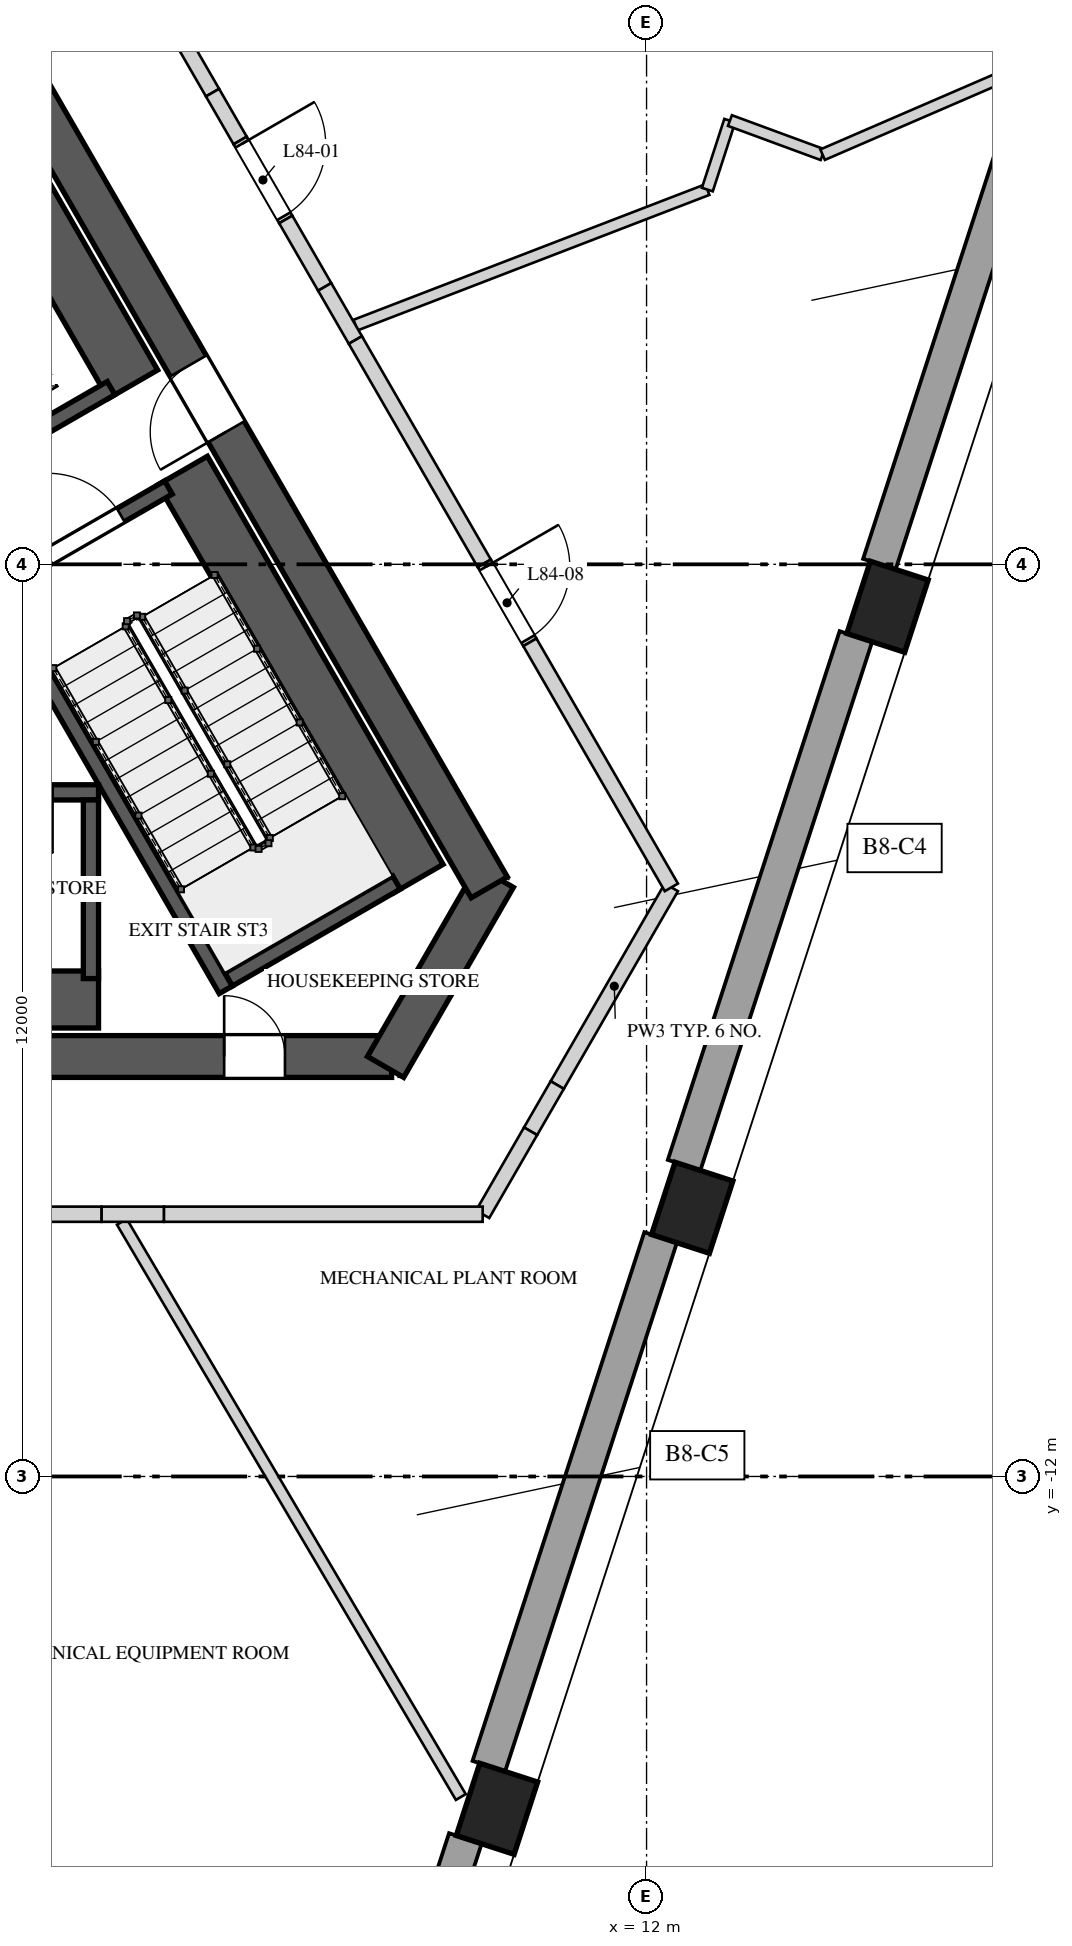
"""IFC4 building model, lengths in metres.
Left out: names, types, materials, properties, quantities, classifications, styles, units other than length and angle.
Written with IfcOpenShell. Run it as: python <this file> out.ifc"""

import sys

from ifc_helpers import new_model, si_unit, direction, frame, frame_2d, origin, origin_2d, place, context, subcontext, project, spatial, polyline, rectangle, outline, extrude, element, fill, save


model = new_model("IFC4")
c1 = context("Model", 3, precision=1e-05, world=origin(), true_north=direction((0.0, 1.0)))
c2 = subcontext(c1, "Body", "Model", "MODEL_VIEW")
j1 = project(units=[si_unit("LENGTHUNIT", "METRE"), si_unit("PLANEANGLEUNIT", "RADIAN")], contexts=[c1])
p1 = place(None, origin())
s1 = spatial("IfcSite", under=j1, at=p1, CompositionType="ELEMENT")
p2 = place(p1, origin())
s2 = spatial("IfcBuilding", under=s1, at=p2, CompositionType="ELEMENT")
p3 = place(p2, frame((0.0, 0.0, 365.9)))
s3 = spatial("IfcBuildingStorey", under=s2, at=p3, CompositionType="ELEMENT", Elevation=365.9)
p4 = place(p3, frame((-8.646, -6.475, 0.0), z_axis=(0.0, 0.0, 1.0), x_axis=(1.0, 0.0, 0.0)))
e1 = element("IfcWall", 1, at=p4, inside=s3, PredefinedType="SHEAR", context=c2, shape_type="SweptSolid", body=[
    extrude(rectangle(XDim=17.292, YDim=0.55, at=frame_2d((8.646, 0.0))), origin(), (0.0, 0.0, 1.0), 4.5),
])
p5 = place(p4, frame((6.851, 0.0, 0.0)))
e2 = element("IfcOpeningElement", 2, at=p5, cuts=e1, PredefinedType="OPENING", context=c2, shape_type="SweptSolid", body=[
    extrude(rectangle(XDim=1.0, YDim=2.4, at=frame_2d((0.5, 1.2))), frame((0.0, 0.285, 0.0), z_axis=(0.0, -1.0, 0.0), x_axis=(1.0, 0.0, 0.0)), (0.0, 0.0, 1.0), 0.57),
])
p6 = place(p4, frame((15.089, 0.0, 0.0)))
e3 = element("IfcOpeningElement", 3, at=p6, cuts=e1, PredefinedType="OPENING", context=c2, shape_type="SweptSolid", body=[
    extrude(rectangle(XDim=0.8, YDim=2.1, at=frame_2d((0.4, 1.05))), frame((0.0, 0.285, 0.0), z_axis=(0.0, -1.0, 0.0), x_axis=(1.0, 0.0, 0.0)), (0.0, 0.0, 1.0), 0.57),
])
p7 = place(p3, frame((8.566, -6.613, 0.0), z_axis=(0.0, 0.0, 1.0), x_axis=(0.499995765644, 0.866027848477, 0.0)))
e4 = element("IfcWall", 4, at=p7, inside=s3, PredefinedType="SHEAR", context=c2, shape_type="SweptSolid", body=[
    extrude(rectangle(XDim=2.887, YDim=0.55, at=frame_2d((1.443, 0.0))), origin(), (0.0, 0.0, 1.0), 4.5),
])
p8 = place(p3, frame((9.93, -4.25, 0.0), z_axis=(0.0, 0.0, 1.0), x_axis=(-0.499994590896, 0.86602852671, 0.0)))
e5 = element("IfcWall", 5, at=p8, inside=s3, PredefinedType="SHEAR", context=c2, shape_type="SweptSolid", body=[
    extrude(rectangle(XDim=17.292, YDim=0.55, at=frame_2d((8.646, 0.0))), origin(), (0.0, 0.0, 1.0), 4.5),
])
p9 = place(p8, frame((6.921, 0.0, 0.0)))
e6 = element("IfcOpeningElement", 6, at=p9, cuts=e5, PredefinedType="OPENING", context=c2, shape_type="SweptSolid", body=[
    extrude(rectangle(XDim=1.0, YDim=2.4, at=frame_2d((0.5, 1.2))), frame((0.0, 0.285, 0.0), z_axis=(0.0, -1.0, 0.0), x_axis=(1.0, 0.0, 0.0)), (0.0, 0.0, 1.0), 0.57),
])
p10 = place(p8, frame((14.626, 0.0, 0.0)))
e7 = element("IfcOpeningElement", 7, at=p10, cuts=e5, PredefinedType="OPENING", context=c2, shape_type="SweptSolid", body=[
    extrude(rectangle(XDim=0.8, YDim=2.1, at=frame_2d((0.4, 1.05))), frame((0.0, 0.285, 0.0), z_axis=(0.0, -1.0, 0.0), x_axis=(1.0, 0.0, 0.0)), (0.0, 0.0, 1.0), 0.57),
])
for number, where, z_axis, x_axis in (
    (8, (10.032, -16.372, 0.0), (0.0, 0.0, 1.0), (0.309, 0.951, 0.0)),
    (9, (12.601, -8.465, 0.0), (0.0, 0.0, 1.0), (0.309, 0.951, 0.0)),
    (10, (15.17, -0.558, 0.0), (0.0, 0.0, 1.0), (0.309, 0.951, 0.0)),
):
    element("IfcColumn", number, at=place(p3, frame(where, z_axis=z_axis, x_axis=x_axis)), inside=s3, PredefinedType="COLUMN", context=c2, shape_type="SweptSolid", body=[
        extrude(rectangle(XDim=1.0, YDim=0.8, at=origin_2d()), origin(), (0.0, 0.0, 1.0), 4.5),
    ])
p11 = place(p3, frame((7.541, -23.148, 0.0), z_axis=(0.0, 0.0, 1.0), x_axis=(0.309018647645, 0.951055979114, 0.0)))
e11 = element("IfcWall", 11, at=p11, inside=s3, PredefinedType="SOLIDWALL", context=c2, shape_type="SweptSolid", body=[
    extrude(rectangle(XDim=6.714, YDim=0.45, at=frame_2d((3.357, 0.0))), origin(), (0.0, 0.0, 1.0), 3.8),
])
for number, where, z_axis, x_axis in (
    (12, (9.925, -15.812, 0.0), (0.0, 0.0, 1.0), (0.309, 0.951, 0.0)),
    (13, (12.494, -7.905, 0.0), (0.0, 0.0, 1.0), (0.309, 0.951, 0.0)),
    (14, (15.063, 0.002, 0.0), (0.0, 0.0, 1.0), (0.309, 0.951, 0.0)),
):
    element("IfcWall", number, at=place(p3, frame(where, z_axis=z_axis, x_axis=x_axis)), inside=s3, PredefinedType="SOLIDWALL", context=c2, shape_type="SweptSolid", body=[
        extrude(rectangle(XDim=7.314, YDim=0.45, at=frame_2d((3.657, 0.0))), origin(), (0.0, 0.0, 1.0), 3.8),
    ])
p12 = place(p3, frame((8.998, -4.135, 0.0), z_axis=(0.0, 0.0, 1.0), x_axis=(-0.500009909098, 0.866019682689, 0.0)))
e15 = element("IfcWall", 15, at=p12, inside=s3, PredefinedType="SOLIDWALL", context=c2, shape_type="SweptSolid", body=[
    extrude(rectangle(XDim=6.2, YDim=0.75, at=frame_2d((3.1, 0.0))), origin(), (0.0, 0.0, 1.0), 4.15),
])
p13 = place(p3, frame((6.465, -5.597, 0.0), z_axis=(0.0, 0.0, 1.0), x_axis=(-0.49998037582, 0.866036733513, 0.0)))
e16 = element("IfcWall", 16, at=p13, inside=s3, PredefinedType="SOLIDWALL", context=c2, shape_type="SweptSolid", body=[
    extrude(rectangle(XDim=6.2, YDim=0.2, at=frame_2d((3.1, 0.0))), origin(), (0.0, 0.0, 1.0), 4.15),
])
p14 = place(p3, frame((6.501, -5.461, 0.0), z_axis=(0.0, 0.0, 1.0), x_axis=(0.865989465428, 0.500062241894, 0.0)))
e17 = element("IfcWall", 17, at=p14, inside=s3, PredefinedType="SOLIDWALL", context=c2, shape_type="SweptSolid", body=[
    extrude(rectangle(XDim=2.55, YDim=0.2, at=frame_2d((1.275, 0.0))), origin(), (0.0, 0.0, 1.0), 4.15),
])
p15 = place(p3, frame((3.501, -0.265, 0.0), z_axis=(0.0, 0.0, 1.0), x_axis=(0.866030925526, 0.499990435942, 0.0)))
e18 = element("IfcWall", 18, at=p15, inside=s3, PredefinedType="SOLIDWALL", context=c2, shape_type="SweptSolid", body=[
    extrude(rectangle(XDim=2.55, YDim=0.2, at=frame_2d((1.275, 0.0))), origin(), (0.0, 0.0, 1.0), 4.15),
])
p16 = place(p15, frame((0.725, 0.0, 0.0)))
e19 = element("IfcOpeningElement", 19, at=p16, cuts=e18, PredefinedType="OPENING", context=c2, shape_type="SweptSolid", body=[
    extrude(rectangle(XDim=1.1, YDim=2.4, at=frame_2d((0.55, 1.2))), frame((0.0, 0.11, 0.0), z_axis=(0.0, -1.0, 0.0), x_axis=(1.0, 0.0, 0.0)), (0.0, 0.0, 1.0), 0.22),
])
p17 = place(p3, frame((4.79, -3.0, 0.0), z_axis=(0.0, 0.0, 1.0), x_axis=(-1.0, 0.0, 0.0)))
e20 = element("IfcWall", 20, at=p17, inside=s3, PredefinedType="SOLIDWALL", context=c2, shape_type="SweptSolid", body=[
    extrude(rectangle(XDim=5.5, YDim=0.2, at=frame_2d((2.75, 0.0))), origin(), (0.0, 0.0, 1.0), 4.15),
])
p18 = place(p17, frame((3.12, 0.0, 0.0)))
e21 = element("IfcOpeningElement", 21, at=p18, cuts=e20, PredefinedType="OPENING", context=c2, shape_type="SweptSolid", body=[
    extrude(rectangle(XDim=0.95, YDim=2.4, at=frame_2d((0.475, 1.2))), frame((0.0, 0.11, 0.0), z_axis=(0.0, -1.0, 0.0), x_axis=(1.0, 0.0, 0.0)), (0.0, 0.0, 1.0), 0.22),
])
p19 = place(p17, frame((0.605, 0.0, 0.0)))
e22 = element("IfcOpeningElement", 22, at=p19, cuts=e20, PredefinedType="OPENING", context=c2, shape_type="SweptSolid", body=[
    extrude(rectangle(XDim=0.8, YDim=2.1, at=frame_2d((0.4, 1.05))), frame((0.0, 0.11, 0.0), z_axis=(0.0, -1.0, 0.0), x_axis=(1.0, 0.0, 0.0)), (0.0, 0.0, 1.0), 0.22),
])
p20 = place(p3, frame((-0.71, -5.725, 0.0), z_axis=(0.0, 0.0, 1.0), x_axis=(1.0, 0.0, 0.0)))
e23 = element("IfcWall", 23, at=p20, inside=s3, PredefinedType="SOLIDWALL", context=c2, shape_type="SweptSolid", body=[
    extrude(rectangle(XDim=5.5, YDim=0.75, at=frame_2d((2.75, 0.0))), origin(), (0.0, 0.0, 1.0), 4.15),
])
p21 = place(p3, frame((4.69, -3.1, 0.0), z_axis=(0.0, 0.0, 1.0), x_axis=(0.0, -1.0, 0.0)))
e24 = element("IfcWall", 24, at=p21, inside=s3, PredefinedType="SOLIDWALL", context=c2, shape_type="SweptSolid", body=[
    extrude(rectangle(XDim=2.35, YDim=0.2, at=frame_2d((1.175, 0.0))), origin(), (0.0, 0.0, 1.0), 4.15),
])
p22 = place(p3, frame((5.243, 2.369, 0.0), z_axis=(0.0, 0.0, 1.0), x_axis=(-0.500002801628, 0.866023786258, 0.0)))
e25 = element("IfcWall", 25, at=p22, inside=s3, PredefinedType="SOLIDWALL", context=c2, shape_type="SweptSolid", body=[
    extrude(rectangle(XDim=4.9, YDim=0.75, at=frame_2d((2.45, 0.0))), origin(), (0.0, 0.0, 1.0), 4.15),
])
p23 = place(p3, frame((2.227, 0.743, 0.0), z_axis=(0.0, 0.0, 1.0), x_axis=(0.866035871367, 0.499981869177, 0.0)))
e26 = element("IfcWall", 26, at=p23, inside=s3, PredefinedType="SOLIDWALL", context=c2, shape_type="SweptSolid", body=[
    extrude(rectangle(XDim=3.15, YDim=0.2, at=frame_2d((1.575, 0.0))), origin(), (0.0, 0.0, 1.0), 4.15),
])
p24 = place(p3, frame((5.097, -8.65, 0.0), z_axis=(0.0, 0.0, 1.0), x_axis=(0.507661360347, -0.861556697618, 0.0)))
e27 = element("IfcWall", 27, at=p24, inside=s3, PredefinedType="PARTITIONING", context=c2, shape_type="SweptSolid", body=[
    extrude(rectangle(XDim=8.783, YDim=0.15, at=frame_2d((4.392, 0.0))), origin(), (0.0, 0.0, 1.0), 3.45),
])
p25 = place(p3, frame((12.8, 4.93, 0.0), z_axis=(0.0, 0.0, 1.0), x_axis=(-0.933162813033, -0.359453980884, 0.0)))
e28 = element("IfcWall", 28, at=p25, inside=s3, PredefinedType="PARTITIONING", context=c2, shape_type="SweptSolid", body=[
    extrude(rectangle(XDim=4.96, YDim=0.15, at=frame_2d((2.48, 0.0))), origin(), (0.0, 0.0, 1.0), 3.25),
])
p26 = place(p3, frame((13.094, 5.837, 0.0), z_axis=(0.0, 0.0, 1.0), x_axis=(-0.309074492062, -0.951037832243, 0.0)))
e29 = element("IfcWall", 29, at=p26, inside=s3, PredefinedType="PARTITIONING", context=c2, shape_type="SweptSolid", body=[
    extrude(rectangle(XDim=0.953, YDim=0.15, at=frame_2d((0.477, 0.0))), origin(), (0.0, 0.0, 1.0), 3.25),
])
p27 = place(p3, frame((14.316, 5.389, 0.0), z_axis=(0.0, 0.0, 1.0), x_axis=(-0.938458564783, 0.345391838621, 0.0)))
e30 = element("IfcWall", 30, at=p27, inside=s3, PredefinedType="PARTITIONING", context=c2, shape_type="SweptSolid", body=[
    extrude(rectangle(XDim=1.299, YDim=0.15, at=frame_2d((0.649, 0.0))), origin(), (0.0, 0.0, 1.0), 3.25),
])
p28 = place(p3, frame((16.946, 6.527, 0.0), z_axis=(0.0, 0.0, 1.0), x_axis=(-0.917782364591, -0.397083783659, 0.0)))
e31 = element("IfcWall", 31, at=p28, inside=s3, PredefinedType="PARTITIONING", context=c2, shape_type="SweptSolid", body=[
    extrude(rectangle(XDim=2.866, YDim=0.15, at=frame_2d((1.433, 0.0))), origin(), (0.0, 0.0, 1.0), 4.15),
])
p29 = place(p3, frame((12.326, -4.25, 0.0), z_axis=(0.0, 0.0, 1.0), x_axis=(-0.500003959331, -0.866023117852, 0.0)))
e32 = element("IfcWall", 32, at=p29, inside=s3, PredefinedType="SOLIDWALL", context=c2, shape_type="SweptSolid", body=[
    extrude(rectangle(XDim=3.003, YDim=0.2, at=frame_2d((1.501, 0.0))), origin(), (0.0, 0.0, 1.0), 4.15),
])
p30 = place(p3, frame((10.825, -6.851, 0.0), z_axis=(0.0, 0.0, 1.0), x_axis=(-0.500144223137, -0.865942120504, 0.0)))
e33 = element("IfcWall", 33, at=p30, inside=s3, PredefinedType="SOLIDWALL", context=c2, shape_type="SweptSolid", body=[
    extrude(rectangle(XDim=0.701, YDim=0.2, at=frame_2d((0.351, 0.0))), origin(), (0.0, 0.0, 1.0), 3.45),
])
p31 = place(p3, frame((10.474, -7.458, 0.0), z_axis=(0.0, 0.0, 1.0), x_axis=(-0.499929168788, -0.866066294342, 0.0)))
e34 = element("IfcWall", 34, at=p31, inside=s3, PredefinedType="SOLIDWALL", context=c2, shape_type="SweptSolid", body=[
    extrude(rectangle(XDim=1.261, YDim=0.2, at=frame_2d((0.63, 0.0))), origin(), (0.0, 0.0, 1.0), 4.15),
])
p32 = place(p3, frame((9.844, -8.55, 0.0), z_axis=(0.0, 0.0, 1.0), x_axis=(-1.0, 0.0, 0.0)))
e35 = element("IfcWall", 35, at=p32, inside=s3, PredefinedType="SOLIDWALL", context=c2, shape_type="SweptSolid", body=[
    extrude(rectangle(XDim=4.194, YDim=0.2, at=frame_2d((2.097, 0.0))), origin(), (0.0, 0.0, 1.0), 4.15),
])
p33 = place(p3, frame((5.649, -8.55, 0.0), z_axis=(0.0, 0.0, 1.0), x_axis=(-1.0, 0.0, 0.0)))
e36 = element("IfcWall", 36, at=p33, inside=s3, PredefinedType="SOLIDWALL", context=c2, shape_type="SweptSolid", body=[
    extrude(rectangle(XDim=0.821, YDim=0.2, at=frame_2d((0.411, 0.0))), origin(), (0.0, 0.0, 1.0), 3.45),
])
p34 = place(p3, frame((4.828, -8.55, 0.0), z_axis=(0.0, 0.0, 1.0), x_axis=(-1.0, 0.0, 0.0)))
e37 = element("IfcWall", 37, at=p34, inside=s3, PredefinedType="SOLIDWALL", context=c2, shape_type="SweptSolid", body=[
    extrude(rectangle(XDim=1.038, YDim=0.2, at=frame_2d((0.519, 0.0))), origin(), (0.0, 0.0, 1.0), 4.15),
])
p35 = place(p3, frame((5.818, 7.023, 0.0), z_axis=(0.0, 0.0, 1.0), x_axis=(0.500006071987, -0.866021898093, 0.0)))
e38 = element("IfcWall", 38, at=p35, inside=s3, PredefinedType="SOLIDWALL", context=c2, shape_type="SweptSolid", body=[
    extrude(rectangle(XDim=0.944, YDim=0.2, at=frame_2d((0.472, 0.0))), origin(), (0.0, 0.0, 1.0), 3.05),
])
p36 = place(p3, frame((6.29, 6.205, 0.0), z_axis=(0.0, 0.0, 1.0), x_axis=(0.500042431503, -0.866000904559, 0.0)))
e39 = element("IfcWall", 39, at=p36, inside=s3, PredefinedType="SOLIDWALL", context=c2, shape_type="SweptSolid", body=[
    extrude(rectangle(XDim=0.727, YDim=0.2, at=frame_2d((0.363, 0.0))), origin(), (0.0, 0.0, 1.0), 4.15),
])
p37 = place(p3, frame((6.653, 5.576, 0.0), z_axis=(0.0, 0.0, 1.0), x_axis=(0.499880961361, -0.866094119867, 0.0)))
e40 = element("IfcWall", 40, at=p37, inside=s3, PredefinedType="SOLIDWALL", context=c2, shape_type="SweptSolid", body=[
    extrude(outline(polyline([(0.0, 0.0), (1.2, 0.0), (1.2, 4.15), (0.986, 4.15), (0.986, 3.05), (0.0, 3.05), (0.0, 0.0)])), frame((0.0, 0.1, 0.0), z_axis=(0.0, -1.0, 0.0), x_axis=(1.0, 0.0, 0.0)), (0.0, 0.0, 1.0), 0.2),
])
p38 = place(p37, frame((0.05, 0.0, 0.0)))
e41 = element("IfcOpeningElement", 41, at=p38, cuts=e40, PredefinedType="OPENING", context=c2, shape_type="SweptSolid", body=[
    extrude(rectangle(XDim=1.1, YDim=2.4, at=frame_2d((0.55, 1.2))), frame((0.0, 0.11, 0.0), z_axis=(0.0, -1.0, 0.0), x_axis=(1.0, 0.0, 0.0)), (0.0, 0.0, 1.0), 0.22),
])
p39 = place(p3, frame((7.253, 4.537, 0.0), z_axis=(0.0, 0.0, 1.0), x_axis=(0.500086965421, -0.865975188453, 0.0)))
e42 = element("IfcWall", 42, at=p39, inside=s3, PredefinedType="SOLIDWALL", context=c2, shape_type="SweptSolid", body=[
    extrude(rectangle(XDim=1.024, YDim=0.2, at=frame_2d((0.512, 0.0))), origin(), (0.0, 0.0, 1.0), 4.15),
])
p40 = place(p3, frame((7.765, 3.65, 0.0), z_axis=(0.0, 0.0, 1.0), x_axis=(0.500141487433, -0.865943700565, 0.0)))
e43 = element("IfcWall", 43, at=p40, inside=s3, PredefinedType="SOLIDWALL", context=c2, shape_type="SweptSolid", body=[
    extrude(rectangle(XDim=0.807, YDim=0.2, at=frame_2d((0.403, 0.0))), origin(), (0.0, 0.0, 1.0), 3.25),
])
p41 = place(p3, frame((8.169, 2.951, 0.0), z_axis=(0.0, 0.0, 1.0), x_axis=(0.499955030392, -0.866051365443, 0.0)))
e44 = element("IfcWall", 44, at=p41, inside=s3, PredefinedType="SOLIDWALL", context=c2, shape_type="SweptSolid", body=[
    extrude(rectangle(XDim=3.392, YDim=0.2, at=frame_2d((1.696, 0.0))), origin(), (0.0, 0.0, 1.0), 4.15),
])
p42 = place(p3, frame((9.865, 0.013, 0.0), z_axis=(0.0, 0.0, 1.0), x_axis=(0.50012165622, -0.865955154139, 0.0)))
e45 = element("IfcWall", 45, at=p42, inside=s3, PredefinedType="SOLIDWALL", context=c2, shape_type="SweptSolid", body=[
    extrude(outline(polyline([(0.0, 0.0), (1.2, 0.0), (1.2, 4.15), (0.857, 4.15), (0.857, 3.45), (0.0, 3.45), (0.0, 0.0)])), frame((0.0, 0.1, 0.0), z_axis=(0.0, -1.0, 0.0), x_axis=(1.0, 0.0, 0.0)), (0.0, 0.0, 1.0), 0.2),
])
p43 = place(p42, frame((0.05, 0.0, 0.0)))
e46 = element("IfcOpeningElement", 46, at=p43, cuts=e45, PredefinedType="OPENING", context=c2, shape_type="SweptSolid", body=[
    extrude(rectangle(XDim=1.1, YDim=2.4, at=frame_2d((0.55, 1.2))), frame((0.0, 0.11, 0.0), z_axis=(0.0, -1.0, 0.0), x_axis=(1.0, 0.0, 0.0)), (0.0, 0.0, 1.0), 0.22),
])
p44 = place(p3, frame((10.465, -1.026, 0.0), z_axis=(0.0, 0.0, 1.0), x_axis=(0.499976014784, -0.866039251212, 0.0)))
e47 = element("IfcWall", 47, at=p44, inside=s3, PredefinedType="SOLIDWALL", context=c2, shape_type="SweptSolid", body=[
    extrude(rectangle(XDim=3.723, YDim=0.2, at=frame_2d((1.861, 0.0))), origin(), (0.0, 0.0, 1.0), 4.15),
])
p45 = place(p16, origin())
e48 = element("IfcDoor", 48, at=p45, inside=s3, OperationType="SINGLE_SWING_RIGHT", PredefinedType="DOOR", context=c2, shape_type="SweptSolid", body=[
    extrude(rectangle(XDim=1.1, YDim=2.4, at=frame_2d((0.55, 1.2))), frame((0.0, 0.025, 0.0), z_axis=(0.0, -1.0, 0.0), x_axis=(1.0, 0.0, 0.0)), (0.0, 0.0, 1.0), 0.05),
])
fill(e19, e48)
p46 = place(p19, origin())
e49 = element("IfcDoor", 49, at=p46, inside=s3, OperationType="SINGLE_SWING_RIGHT", PredefinedType="DOOR", context=c2, shape_type="SweptSolid", body=[
    extrude(rectangle(XDim=0.8, YDim=2.1, at=frame_2d((0.4, 1.05))), frame((0.0, 0.025, 0.0), z_axis=(0.0, -1.0, 0.0), x_axis=(1.0, 0.0, 0.0)), (0.0, 0.0, 1.0), 0.05),
])
fill(e22, e49)
p47 = place(p9, origin())
e50 = element("IfcDoor", 50, at=p47, inside=s3, OperationType="SINGLE_SWING_RIGHT", PredefinedType="DOOR", context=c2, shape_type="SweptSolid", body=[
    extrude(rectangle(XDim=1.0, YDim=2.4, at=frame_2d((0.5, 1.2))), frame((0.0, 0.025, 0.0), z_axis=(0.0, -1.0, 0.0), x_axis=(1.0, 0.0, 0.0)), (0.0, 0.0, 1.0), 0.05),
])
fill(e6, e50)
p48 = place(p6, origin())
e51 = element("IfcDoor", 51, at=p48, inside=s3, OperationType="SINGLE_SWING_LEFT", PredefinedType="DOOR", context=c2, shape_type="SweptSolid", body=[
    extrude(rectangle(XDim=0.8, YDim=2.1, at=frame_2d((0.4, 1.05))), frame((0.0, 0.025, 0.0), z_axis=(0.0, -1.0, 0.0), x_axis=(1.0, 0.0, 0.0)), (0.0, 0.0, 1.0), 0.05),
])
fill(e3, e51)
p49 = place(p38, origin())
e52 = element("IfcDoor", 52, at=p49, inside=s3, OperationType="SINGLE_SWING_LEFT", PredefinedType="DOOR", context=c2, shape_type="SweptSolid", body=[
    extrude(rectangle(XDim=1.1, YDim=2.4, at=frame_2d((0.55, 1.2))), frame((0.0, 0.025, 0.0), z_axis=(0.0, -1.0, 0.0), x_axis=(1.0, 0.0, 0.0)), (0.0, 0.0, 1.0), 0.05),
])
fill(e41, e52)
p50 = place(p43, origin())
e53 = element("IfcDoor", 53, at=p50, inside=s3, OperationType="SINGLE_SWING_RIGHT", PredefinedType="DOOR", context=c2, shape_type="SweptSolid", body=[
    extrude(rectangle(XDim=1.1, YDim=2.4, at=frame_2d((0.55, 1.2))), frame((0.0, 0.025, 0.0), z_axis=(0.0, -1.0, 0.0), x_axis=(1.0, 0.0, 0.0)), (0.0, 0.0, 1.0), 0.05),
])
fill(e46, e53)
save(model, sys.argv[1])
